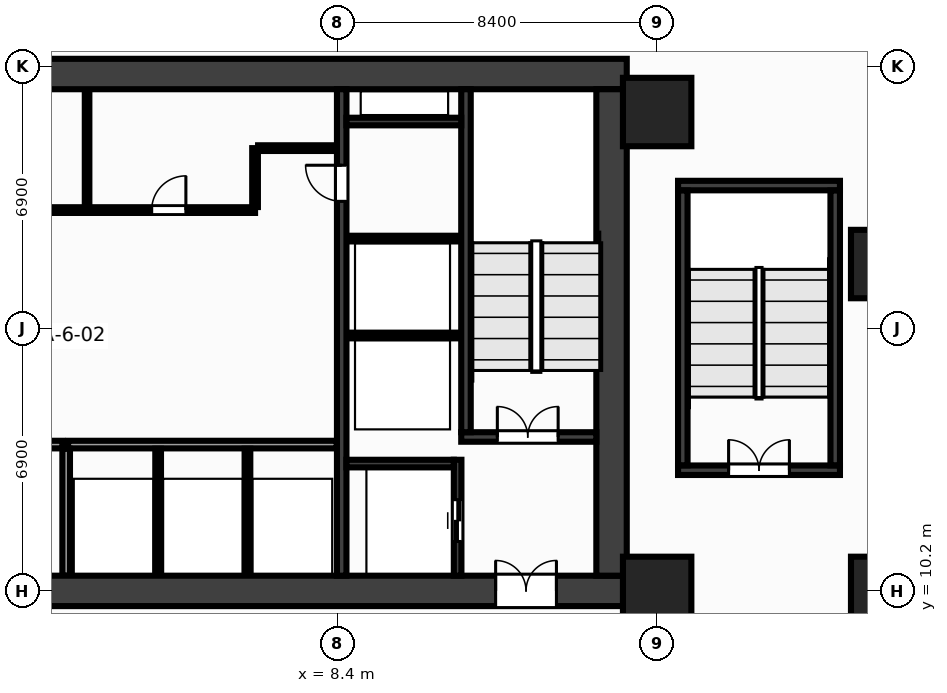
"""IFC4 building model, lengths in metres.
Left out: names, types, materials, properties, quantities, classifications, styles, units other than length and angle.
Written with IfcOpenShell. Run it as: python <this file> out.ifc"""

import sys

from ifc_helpers import new_model, si_unit, direction, frame, frame_2d, origin, origin_2d, place, context, subcontext, project, spatial, rectangle, extrude, source, transform, mapped, element, fill, save


model = new_model("IFC4")
c1 = context("Model", 3, precision=1e-05, world=origin(), true_north=direction((0.0, 1.0)))
c2 = subcontext(c1, "Body", "Model", "MODEL_VIEW")
j1 = project(units=[si_unit("LENGTHUNIT", "METRE"), si_unit("PLANEANGLEUNIT", "RADIAN")], contexts=[c1])
p1 = place(None, origin())
s1 = spatial("IfcSite", under=j1, at=p1, CompositionType="ELEMENT")
p2 = place(p1, origin())
s2 = spatial("IfcBuilding", under=s1, at=p2, CompositionType="ELEMENT")
p3 = place(p2, frame((0.0, 0.0, 9.65)))
s3 = spatial("IfcBuildingStorey", under=s2, at=p3, CompositionType="ELEMENT", Elevation=9.65)
m1 = source(origin(), c2, "Body", "SweptSolid", [
    extrude(rectangle(XDim=32.0, YDim=0.8, at=frame_2d((16.0, 0.0))), origin(), (0.0, 0.0, 1.0), 4.65),
])
p4 = place(p3, frame((-16.0, 23.8, 0.0), z_axis=(0.0, 0.0, 1.0), x_axis=(1.0, 0.0, 0.0)))
e1 = element("IfcWall", 1, at=p4, inside=s3, PredefinedType="SHEAR", context=c2, shape_type="MappedRepresentation", body=[
    mapped(m1, transform((0.0, 0.0, 0.0), x_axis=(1.0, 0.0, 0.0), y_axis=(0.0, 1.0, 0.0), z_axis=(0.0, 0.0, 1.0), scale=1.0)),
])
p5 = place(p3, frame((-16.0, 10.2, 0.0), z_axis=(0.0, 0.0, 1.0), x_axis=(1.0, 0.0, 0.0)))
e2 = element("IfcWall", 2, at=p5, inside=s3, PredefinedType="SHEAR", context=c2, shape_type="MappedRepresentation", body=[
    mapped(m1, transform((0.0, 0.0, 0.0), x_axis=(1.0, 0.0, 0.0), y_axis=(0.0, 1.0, 0.0), z_axis=(0.0, 0.0, 1.0), scale=1.0)),
])
p6 = place(p5, frame((1.85, 0.0, 0.0)))
e3 = element("IfcOpeningElement", 3, at=p6, cuts=e2, PredefinedType="OPENING", context=c2, shape_type="SweptSolid", body=[
    extrude(rectangle(XDim=1.6, YDim=2.15, at=frame_2d((0.8, 1.075))), frame((0.0, 0.412, 0.0), z_axis=(0.0, -1.0, 0.0), x_axis=(1.0, 0.0, 0.0)), (0.0, 0.0, 1.0), 0.824),
])
p7 = place(p5, frame((28.55, 0.0, 0.0)))
e4 = element("IfcOpeningElement", 4, at=p7, cuts=e2, PredefinedType="OPENING", context=c2, shape_type="SweptSolid", body=[
    extrude(rectangle(XDim=1.6, YDim=2.15, at=frame_2d((0.8, 1.075))), frame((0.0, 0.412, 0.0), z_axis=(0.0, -1.0, 0.0), x_axis=(1.0, 0.0, 0.0)), (0.0, 0.0, 1.0), 0.824),
])
p8 = place(p5, frame((15.25, 0.0, 0.0)))
e5 = element("IfcOpeningElement", 5, at=p8, cuts=e2, PredefinedType="OPENING", context=c2, shape_type="SweptSolid", body=[
    extrude(rectangle(XDim=1.5, YDim=2.2, at=frame_2d((0.75, 1.1))), frame((0.0, 0.412, 0.0), z_axis=(0.0, -1.0, 0.0), x_axis=(1.0, 0.0, 0.0)), (0.0, 0.0, 1.0), 0.824),
])
m2 = source(origin(), c2, "Body", "SweptSolid", [
    extrude(rectangle(XDim=12.8, YDim=0.8, at=frame_2d((6.4, 0.0))), origin(), (0.0, 0.0, 1.0), 4.65),
])
p9 = place(p3, frame((15.6, 10.6, 0.0), z_axis=(0.0, 0.0, 1.0), x_axis=(0.0, 1.0, 0.0)))
e6 = element("IfcWall", 6, at=p9, inside=s3, PredefinedType="SHEAR", context=c2, shape_type="MappedRepresentation", body=[
    mapped(m2, transform((0.0, 0.0, 0.0), x_axis=(1.0, 0.0, 0.0), y_axis=(0.0, 1.0, 0.0), z_axis=(0.0, 0.0, 1.0), scale=1.0)),
])
m3 = source(origin(), c2, "Body", "SweptSolid", [
    extrude(rectangle(XDim=12.8, YDim=0.25, at=frame_2d((6.4, 0.0))), origin(), (0.0, 0.0, 1.0), 4.65),
])
p10 = place(p3, frame((8.5, 10.6, 0.0), z_axis=(0.0, 0.0, 1.0), x_axis=(0.0, 1.0, 0.0)))
e7 = element("IfcWall", 7, at=p10, inside=s3, PredefinedType="SHEAR", context=c2, shape_type="MappedRepresentation", body=[
    mapped(m3, transform((0.0, 0.0, 0.0), x_axis=(1.0, 0.0, 0.0), y_axis=(0.0, 1.0, 0.0), z_axis=(0.0, 0.0, 1.0), scale=1.0)),
])
p11 = place(p10, frame((9.85, 0.0, 0.0)))
e8 = element("IfcOpeningElement", 8, at=p11, cuts=e7, PredefinedType="OPENING", context=c2, shape_type="SweptSolid", body=[
    extrude(rectangle(XDim=0.95, YDim=2.15, at=frame_2d((0.475, 1.075))), frame((0.0, 0.137, 0.0), z_axis=(0.0, -1.0, 0.0), x_axis=(1.0, 0.0, 0.0)), (0.0, 0.0, 1.0), 0.274),
])
m4 = source(origin(), c2, "Body", "SweptSolid", [
    extrude(rectangle(XDim=3.555, YDim=0.25, at=frame_2d((1.777, 0.0))), origin(), (0.0, 0.0, 1.0), 4.65),
])
p12 = place(p3, frame((11.645, 14.25, 0.0), z_axis=(0.0, 0.0, 1.0), x_axis=(1.0, 0.0, 0.0)))
e9 = element("IfcWall", 9, at=p12, inside=s3, PredefinedType="SHEAR", context=c2, shape_type="MappedRepresentation", body=[
    mapped(m4, transform((0.0, 0.0, 0.0), x_axis=(1.0, 0.0, 0.0), y_axis=(0.0, 1.0, 0.0), z_axis=(0.0, 0.0, 1.0), scale=1.0)),
])
p13 = place(p12, frame((0.95, 0.0, 0.0)))
e10 = element("IfcOpeningElement", 10, at=p13, cuts=e9, PredefinedType="OPENING", context=c2, shape_type="SweptSolid", body=[
    extrude(rectangle(XDim=1.6, YDim=2.15, at=frame_2d((0.8, 1.075))), frame((0.0, 0.137, 0.0), z_axis=(0.0, -1.0, 0.0), x_axis=(1.0, 0.0, 0.0)), (0.0, 0.0, 1.0), 0.274),
])
m5 = source(origin(), c2, "Body", "SweptSolid", [
    extrude(rectangle(XDim=9.025, YDim=0.25, at=frame_2d((4.512, 0.0))), origin(), (0.0, 0.0, 1.0), 4.65),
])
p14 = place(p3, frame((11.77, 14.375, 0.0), z_axis=(0.0, 0.0, 1.0), x_axis=(0.0, 1.0, 0.0)))
e11 = element("IfcWall", 11, at=p14, inside=s3, PredefinedType="SHEAR", context=c2, shape_type="MappedRepresentation", body=[
    mapped(m5, transform((0.0, 0.0, 0.0), x_axis=(1.0, 0.0, 0.0), y_axis=(0.0, 1.0, 0.0), z_axis=(0.0, 0.0, 1.0), scale=1.0)),
])
m6 = source(origin(), c2, "Body", "SweptSolid", [
    extrude(rectangle(XDim=3.05, YDim=0.2, at=frame_2d((1.525, 0.0))), origin(), (0.0, 0.0, 1.0), 4.65),
])
p15 = place(p3, frame((11.55, 10.6, 0.0), z_axis=(0.0, 0.0, 1.0), x_axis=(0.0, 1.0, 0.0)))
e12 = element("IfcWall", 12, at=p15, inside=s3, PredefinedType="SHEAR", context=c2, shape_type="MappedRepresentation", body=[
    mapped(m6, transform((0.0, 0.0, 0.0), x_axis=(1.0, 0.0, 0.0), y_axis=(0.0, 1.0, 0.0), z_axis=(0.0, 0.0, 1.0), scale=1.0)),
])
p16 = place(p15, frame((0.9, 0.0, 0.0)))
e13 = element("IfcOpeningElement", 13, at=p16, cuts=e12, PredefinedType="OPENING", context=c2, shape_type="SweptSolid", body=[
    extrude(rectangle(XDim=1.1, YDim=2.15, at=frame_2d((0.55, 1.075))), frame((0.0, 0.112, 0.0), z_axis=(0.0, -1.0, 0.0), x_axis=(1.0, 0.0, 0.0)), (0.0, 0.0, 1.0), 0.224),
])
m7 = source(origin(), c2, "Body", "SweptSolid", [
    extrude(rectangle(XDim=2.825, YDim=0.2, at=frame_2d((1.413, 0.0))), origin(), (0.0, 0.0, 1.0), 4.65),
])
p17 = place(p3, frame((8.625, 13.55, 0.0), z_axis=(0.0, 0.0, 1.0), x_axis=(1.0, 0.0, 0.0)))
e14 = element("IfcWall", 14, at=p17, inside=s3, PredefinedType="SHEAR", context=c2, shape_type="MappedRepresentation", body=[
    mapped(m7, transform((0.0, 0.0, 0.0), x_axis=(1.0, 0.0, 0.0), y_axis=(0.0, 1.0, 0.0), z_axis=(0.0, 0.0, 1.0), scale=1.0)),
])
m8 = source(origin(), c2, "Body", "SweptSolid", [
    extrude(rectangle(XDim=3.02, YDim=0.2, at=frame_2d((1.51, 0.0))), origin(), (0.0, 0.0, 1.0), 4.65),
])
p18 = place(p3, frame((8.625, 22.55, 0.0), z_axis=(0.0, 0.0, 1.0), x_axis=(1.0, 0.0, 0.0)))
e15 = element("IfcWall", 15, at=p18, inside=s3, PredefinedType="SHEAR", context=c2, shape_type="MappedRepresentation", body=[
    mapped(m8, transform((0.0, 0.0, 0.0), x_axis=(1.0, 0.0, 0.0), y_axis=(0.0, 1.0, 0.0), z_axis=(0.0, 0.0, 1.0), scale=1.0)),
])
m9 = source(origin(), c2, "Body", "SweptSolid", [
    extrude(rectangle(XDim=4.26, YDim=0.25, at=frame_2d((2.13, 0.0))), origin(), (0.0, 0.0, 1.0), 4.65),
])
p19 = place(p3, frame((17.35, 20.865, 0.0), z_axis=(0.0, 0.0, 1.0), x_axis=(1.0, 0.0, 0.0)))
e16 = element("IfcWall", 16, at=p19, inside=s3, PredefinedType="SHEAR", context=c2, shape_type="MappedRepresentation", body=[
    mapped(m9, transform((0.0, 0.0, 0.0), x_axis=(1.0, 0.0, 0.0), y_axis=(0.0, 1.0, 0.0), z_axis=(0.0, 0.0, 1.0), scale=1.0)),
])
p20 = place(p3, frame((17.35, 13.375, 0.0), z_axis=(0.0, 0.0, 1.0), x_axis=(1.0, 0.0, 0.0)))
e17 = element("IfcWall", 17, at=p20, inside=s3, PredefinedType="SHEAR", context=c2, shape_type="MappedRepresentation", body=[
    mapped(m9, transform((0.0, 0.0, 0.0), x_axis=(1.0, 0.0, 0.0), y_axis=(0.0, 1.0, 0.0), z_axis=(0.0, 0.0, 1.0), scale=1.0)),
])
p21 = place(p20, frame((1.33, 0.0, 0.0)))
e18 = element("IfcOpeningElement", 18, at=p21, cuts=e17, PredefinedType="OPENING", context=c2, shape_type="SweptSolid", body=[
    extrude(rectangle(XDim=1.6, YDim=2.15, at=frame_2d((0.8, 1.075))), frame((0.0, 0.137, 0.0), z_axis=(0.0, -1.0, 0.0), x_axis=(1.0, 0.0, 0.0)), (0.0, 0.0, 1.0), 0.274),
])
m10 = source(origin(), c2, "Body", "SweptSolid", [
    extrude(rectangle(XDim=7.23, YDim=0.25, at=frame_2d((3.615, 0.0))), origin(), (0.0, 0.0, 1.0), 4.65),
])
for number, where, z_axis, x_axis in (
    (19, (17.475, 13.505, 0.0), (0.0, 0.0, 1.0), (0.0, 1.0, 0.0)),
    (20, (21.485, 13.505, 0.0), (0.0, 0.0, 1.0), (0.0, 1.0, 0.0)),
):
    element("IfcWall", number, at=place(p3, frame(where, z_axis=z_axis, x_axis=x_axis)), inside=s3, PredefinedType="SHEAR", context=c2, shape_type="MappedRepresentation", body=[
        mapped(m10, transform((0.0, 0.0, 0.0), x_axis=(1.0, 0.0, 0.0), y_axis=(0.0, 1.0, 0.0), z_axis=(0.0, 0.0, 1.0), scale=1.0)),
    ])
m11 = source(origin(), c2, "Body", "SweptSolid", [
    extrude(rectangle(XDim=1.8, YDim=1.8, at=origin_2d()), origin(), (0.0, 0.0, 1.0), 4.65),
])
for number, where, z_axis, x_axis in (
    (21, (16.8, 10.2, 0.0), (0.0, 0.0, 1.0), (1.0, 0.0, 0.0)),
    (22, (16.8, 22.8, 0.0), (0.0, 0.0, 1.0), (1.0, 0.0, 0.0)),
    (23, (22.8, 10.2, 0.0), (0.0, 0.0, 1.0), (1.0, 0.0, 0.0)),
    (24, (22.8, 18.8, 0.0), (0.0, 0.0, 1.0), (1.0, 0.0, 0.0)),
):
    element("IfcColumn", number, at=place(p3, frame(where, z_axis=z_axis, x_axis=x_axis)), inside=s3, PredefinedType="COLUMN", context=c2, shape_type="MappedRepresentation", body=[
        mapped(m11, transform((0.0, 0.0, 0.0), x_axis=(1.0, 0.0, 0.0), y_axis=(0.0, 1.0, 0.0), z_axis=(0.0, 0.0, 1.0), scale=1.0)),
    ])
m12 = source(origin(), c2, "Body", "SweptSolid", [
    extrude(rectangle(XDim=3.01, YDim=0.15, at=frame_2d((1.505, 0.0))), origin(), (0.0, 0.0, 1.0), 4.37),
])
for number, where, z_axis, x_axis in (
    (25, (8.63, 16.92, 0.0), (0.0, 0.0, 1.0), (1.0, 0.0, 0.0)),
    (26, (8.63, 19.47, 0.0), (0.0, 0.0, 1.0), (1.0, 0.0, 0.0)),
):
    element("IfcWall", number, at=place(p3, frame(where, z_axis=z_axis, x_axis=x_axis)), inside=s3, PredefinedType="PARTITIONING", context=c2, shape_type="MappedRepresentation", body=[
        mapped(m12, transform((0.0, 0.0, 0.0), x_axis=(1.0, 0.0, 0.0), y_axis=(0.0, 1.0, 0.0), z_axis=(0.0, 0.0, 1.0), scale=1.0)),
    ])
m13 = source(origin(), c2, "Body", "SweptSolid", [
    extrude(rectangle(XDim=7.07, YDim=0.2, at=frame_2d((3.535, 0.0))), origin(), (0.0, 0.0, 1.0), 4.37),
])
p22 = place(p3, frame((1.3, 14.05, 0.0), z_axis=(0.0, 0.0, 1.0), x_axis=(1.0, 0.0, 0.0)))
e27 = element("IfcWall", 27, at=p22, inside=s3, PredefinedType="PARTITIONING", context=c2, shape_type="MappedRepresentation", body=[
    mapped(m13, transform((0.0, 0.0, 0.0), x_axis=(1.0, 0.0, 0.0), y_axis=(0.0, 1.0, 0.0), z_axis=(0.0, 0.0, 1.0), scale=1.0)),
])
m14 = source(origin(), c2, "Body", "SweptSolid", [
    extrude(rectangle(XDim=3.34, YDim=0.2, at=frame_2d((1.67, 0.0))), origin(), (0.0, 0.0, 1.0), 4.37),
])
p23 = place(p3, frame((1.25, 10.6, 0.0), z_axis=(0.0, 0.0, 1.0), x_axis=(0.0, 1.0, 0.0)))
e28 = element("IfcWall", 28, at=p23, inside=s3, PredefinedType="PARTITIONING", context=c2, shape_type="MappedRepresentation", body=[
    mapped(m14, transform((0.0, 0.0, 0.0), x_axis=(1.0, 0.0, 0.0), y_axis=(0.0, 1.0, 0.0), z_axis=(0.0, 0.0, 1.0), scale=1.0)),
])
m15 = source(origin(), c2, "Body", "SweptSolid", [
    extrude(rectangle(XDim=2.3, YDim=0.2, at=frame_2d((1.15, 0.0))), origin(), (0.0, 0.0, 1.0), 4.37),
])
p24 = place(p3, frame((-1.15, 14.05, 0.0), z_axis=(0.0, 0.0, 1.0), x_axis=(1.0, 0.0, 0.0)))
e29 = element("IfcWall", 29, at=p24, inside=s3, PredefinedType="PARTITIONING", context=c2, shape_type="MappedRepresentation", body=[
    mapped(m15, transform((0.0, 0.0, 0.0), x_axis=(1.0, 0.0, 0.0), y_axis=(0.0, 1.0, 0.0), z_axis=(0.0, 0.0, 1.0), scale=1.0)),
])
p25 = place(p24, frame((0.4, 0.0, 0.0)))
e30 = element("IfcOpeningElement", 30, at=p25, cuts=e29, PredefinedType="OPENING", context=c2, shape_type="SweptSolid", body=[
    extrude(rectangle(XDim=1.5, YDim=2.2, at=frame_2d((0.75, 1.1))), frame((0.0, 0.112, 0.0), z_axis=(0.0, -1.0, 0.0), x_axis=(1.0, 0.0, 0.0)), (0.0, 0.0, 1.0), 0.224),
])
m16 = source(origin(), c2, "Body", "SweptSolid", [
    extrude(rectangle(XDim=14.59, YDim=0.15, at=frame_2d((7.295, 0.0))), origin(), (0.0, 0.0, 1.0), 4.37),
])
p26 = place(p3, frame((-8.37, 20.22, 0.0), z_axis=(0.0, 0.0, 1.0), x_axis=(1.0, 0.0, 0.0)))
e31 = element("IfcWall", 31, at=p26, inside=s3, PredefinedType="PARTITIONING", context=c2, shape_type="MappedRepresentation", body=[
    mapped(m16, transform((0.0, 0.0, 0.0), x_axis=(1.0, 0.0, 0.0), y_axis=(0.0, 1.0, 0.0), z_axis=(0.0, 0.0, 1.0), scale=1.0)),
])
p27 = place(p26, frame((1.06, 0.0, 0.0)))
e32 = element("IfcOpeningElement", 32, at=p27, cuts=e31, PredefinedType="OPENING", context=c2, shape_type="SweptSolid", body=[
    extrude(rectangle(XDim=0.9, YDim=2.15, at=frame_2d((0.45, 1.075))), frame((0.0, 0.087, 0.0), z_axis=(0.0, -1.0, 0.0), x_axis=(1.0, 0.0, 0.0)), (0.0, 0.0, 1.0), 0.174),
])
p28 = place(p26, frame((4.22, 0.0, 0.0)))
e33 = element("IfcOpeningElement", 33, at=p28, cuts=e31, PredefinedType="OPENING", context=c2, shape_type="SweptSolid", body=[
    extrude(rectangle(XDim=0.9, YDim=2.15, at=frame_2d((0.45, 1.075))), frame((0.0, 0.087, 0.0), z_axis=(0.0, -1.0, 0.0), x_axis=(1.0, 0.0, 0.0)), (0.0, 0.0, 1.0), 0.174),
])
p29 = place(p26, frame((7.82, 0.0, 0.0)))
e34 = element("IfcOpeningElement", 34, at=p29, cuts=e31, PredefinedType="OPENING", context=c2, shape_type="SweptSolid", body=[
    extrude(rectangle(XDim=0.9, YDim=2.15, at=frame_2d((0.45, 1.075))), frame((0.0, 0.087, 0.0), z_axis=(0.0, -1.0, 0.0), x_axis=(1.0, 0.0, 0.0)), (0.0, 0.0, 1.0), 0.174),
])
p30 = place(p26, frame((11.87, 0.0, 0.0)))
e35 = element("IfcOpeningElement", 35, at=p30, cuts=e31, PredefinedType="OPENING", context=c2, shape_type="SweptSolid", body=[
    extrude(rectangle(XDim=0.9, YDim=2.15, at=frame_2d((0.45, 1.075))), frame((0.0, 0.087, 0.0), z_axis=(0.0, -1.0, 0.0), x_axis=(1.0, 0.0, 0.0)), (0.0, 0.0, 1.0), 0.174),
])
m17 = source(origin(), c2, "Body", "SweptSolid", [
    extrude(rectangle(XDim=1.55, YDim=0.15, at=frame_2d((0.775, 0.0))), origin(), (0.0, 0.0, 1.0), 4.37),
])
p31 = place(p3, frame((6.22, 20.3, 0.0), z_axis=(0.0, 0.0, 1.0), x_axis=(0.0, 1.0, 0.0)))
e36 = element("IfcWall", 36, at=p31, inside=s3, PredefinedType="PARTITIONING", context=c2, shape_type="MappedRepresentation", body=[
    mapped(m17, transform((0.0, 0.0, 0.0), x_axis=(1.0, 0.0, 0.0), y_axis=(0.0, 1.0, 0.0), z_axis=(0.0, 0.0, 1.0), scale=1.0)),
])
m18 = source(origin(), c2, "Body", "SweptSolid", [
    extrude(rectangle(XDim=2.07, YDim=0.15, at=frame_2d((1.035, 0.0))), origin(), (0.0, 0.0, 1.0), 4.37),
])
p32 = place(p3, frame((6.3, 21.85, 0.0), z_axis=(0.0, 0.0, 1.0), x_axis=(1.0, 0.0, 0.0)))
e37 = element("IfcWall", 37, at=p32, inside=s3, PredefinedType="PARTITIONING", context=c2, shape_type="MappedRepresentation", body=[
    mapped(m18, transform((0.0, 0.0, 0.0), x_axis=(1.0, 0.0, 0.0), y_axis=(0.0, 1.0, 0.0), z_axis=(0.0, 0.0, 1.0), scale=1.0)),
])
m19 = source(origin(), c2, "Body", "SweptSolid", [
    extrude(rectangle(XDim=3.34, YDim=0.15, at=frame_2d((1.67, 0.0))), origin(), (0.0, 0.0, 1.0), 4.37),
])
for number, where, z_axis, x_axis in (
    (38, (3.67, 10.6, 0.0), (0.0, 0.0, 1.0), (0.0, 1.0, 0.0)),
    (39, (6.02, 10.6, 0.0), (0.0, 0.0, 1.0), (0.0, 1.0, 0.0)),
):
    element("IfcWall", number, at=place(p3, frame(where, z_axis=z_axis, x_axis=x_axis)), inside=s3, PredefinedType="PARTITIONING", context=c2, shape_type="MappedRepresentation", body=[
        mapped(m19, transform((0.0, 0.0, 0.0), x_axis=(1.0, 0.0, 0.0), y_axis=(0.0, 1.0, 0.0), z_axis=(0.0, 0.0, 1.0), scale=1.0)),
    ])
m20 = source(origin(), c2, "Body", "SweptSolid", [
    extrude(rectangle(XDim=3.04, YDim=0.12, at=frame_2d((1.52, 0.0))), origin(), (0.0, 0.0, 1.0), 4.37),
])
p33 = place(p3, frame((1.8, 20.32, 0.0), z_axis=(0.0, 0.0, 1.0), x_axis=(0.0, 1.0, 0.0)))
e40 = element("IfcWall", 40, at=p33, inside=s3, PredefinedType="PARTITIONING", context=c2, shape_type="MappedRepresentation", body=[
    mapped(m20, transform((0.0, 0.0, 0.0), x_axis=(1.0, 0.0, 0.0), y_axis=(0.0, 1.0, 0.0), z_axis=(0.0, 0.0, 1.0), scale=1.0)),
])
m21 = source(origin(), c2, "Body", "SweptSolid", [
    extrude(rectangle(XDim=1.6, YDim=2.15, at=frame_2d((0.8, 1.075))), frame((0.0, 0.025, 0.0), z_axis=(0.0, -1.0, 0.0), x_axis=(1.0, 0.0, 0.0)), (0.0, 0.0, 1.0), 0.05),
])
p34 = place(p13, origin())
e41 = element("IfcDoor", 41, at=p34, inside=s3, OperationType="DOUBLE_DOOR_SINGLE_SWING", PredefinedType="DOOR", context=c2, shape_type="MappedRepresentation", body=[
    mapped(m21, transform((0.0, 0.0, 0.0), x_axis=(1.0, 0.0, 0.0), y_axis=(0.0, 1.0, 0.0), z_axis=(0.0, 0.0, 1.0), scale=1.0)),
])
fill(e10, e41)
p35 = place(p7, origin())
e42 = element("IfcDoor", 42, at=p35, inside=s3, OperationType="DOUBLE_DOOR_SINGLE_SWING", PredefinedType="DOOR", context=c2, shape_type="MappedRepresentation", body=[
    mapped(m21, transform((0.0, 0.0, 0.0), x_axis=(1.0, 0.0, 0.0), y_axis=(0.0, 1.0, 0.0), z_axis=(0.0, 0.0, 1.0), scale=1.0)),
])
fill(e4, e42)
m22 = source(origin(), c2, "Body", "SweptSolid", [
    extrude(rectangle(XDim=1.1, YDim=2.15, at=frame_2d((0.55, 1.075))), frame((0.0, 0.025, 0.0), z_axis=(0.0, -1.0, 0.0), x_axis=(1.0, 0.0, 0.0)), (0.0, 0.0, 1.0), 0.05),
])
p36 = place(p16, origin())
e43 = element("IfcDoor", 43, at=p36, inside=s3, OperationType="DOUBLE_DOOR_SLIDING", PredefinedType="DOOR", context=c2, shape_type="MappedRepresentation", body=[
    mapped(m22, transform((0.0, 0.0, 0.0), x_axis=(1.0, 0.0, 0.0), y_axis=(0.0, 1.0, 0.0), z_axis=(0.0, 0.0, 1.0), scale=1.0)),
])
fill(e13, e43)
p37 = place(p21, origin())
e44 = element("IfcDoor", 44, at=p37, inside=s3, OperationType="DOUBLE_DOOR_SINGLE_SWING", PredefinedType="DOOR", context=c2, shape_type="MappedRepresentation", body=[
    mapped(m21, transform((0.0, 0.0, 0.0), x_axis=(1.0, 0.0, 0.0), y_axis=(0.0, 1.0, 0.0), z_axis=(0.0, 0.0, 1.0), scale=1.0)),
])
fill(e18, e44)
m23 = source(origin(), c2, "Body", "SweptSolid", [
    extrude(rectangle(XDim=0.95, YDim=2.15, at=frame_2d((0.475, 1.075))), frame((0.0, 0.025, 0.0), z_axis=(0.0, -1.0, 0.0), x_axis=(1.0, 0.0, 0.0)), (0.0, 0.0, 1.0), 0.05),
])
p38 = place(p11, origin())
e45 = element("IfcDoor", 45, at=p38, inside=s3, OperationType="SINGLE_SWING_RIGHT", PredefinedType="DOOR", context=c2, shape_type="MappedRepresentation", body=[
    mapped(m23, transform((0.0, 0.0, 0.0), x_axis=(1.0, 0.0, 0.0), y_axis=(0.0, 1.0, 0.0), z_axis=(0.0, 0.0, 1.0), scale=1.0)),
])
fill(e8, e45)
m24 = source(origin(), c2, "Body", "SweptSolid", [
    extrude(rectangle(XDim=0.9, YDim=2.15, at=frame_2d((0.45, 1.075))), frame((0.0, 0.025, 0.0), z_axis=(0.0, -1.0, 0.0), x_axis=(1.0, 0.0, 0.0)), (0.0, 0.0, 1.0), 0.05),
])
p39 = place(p30, origin())
e46 = element("IfcDoor", 46, at=p39, inside=s3, OperationType="SINGLE_SWING_RIGHT", PredefinedType="DOOR", context=c2, shape_type="MappedRepresentation", body=[
    mapped(m24, transform((0.0, 0.0, 0.0), x_axis=(1.0, 0.0, 0.0), y_axis=(0.0, 1.0, 0.0), z_axis=(0.0, 0.0, 1.0), scale=1.0)),
])
fill(e35, e46)
save(model, sys.argv[1])
